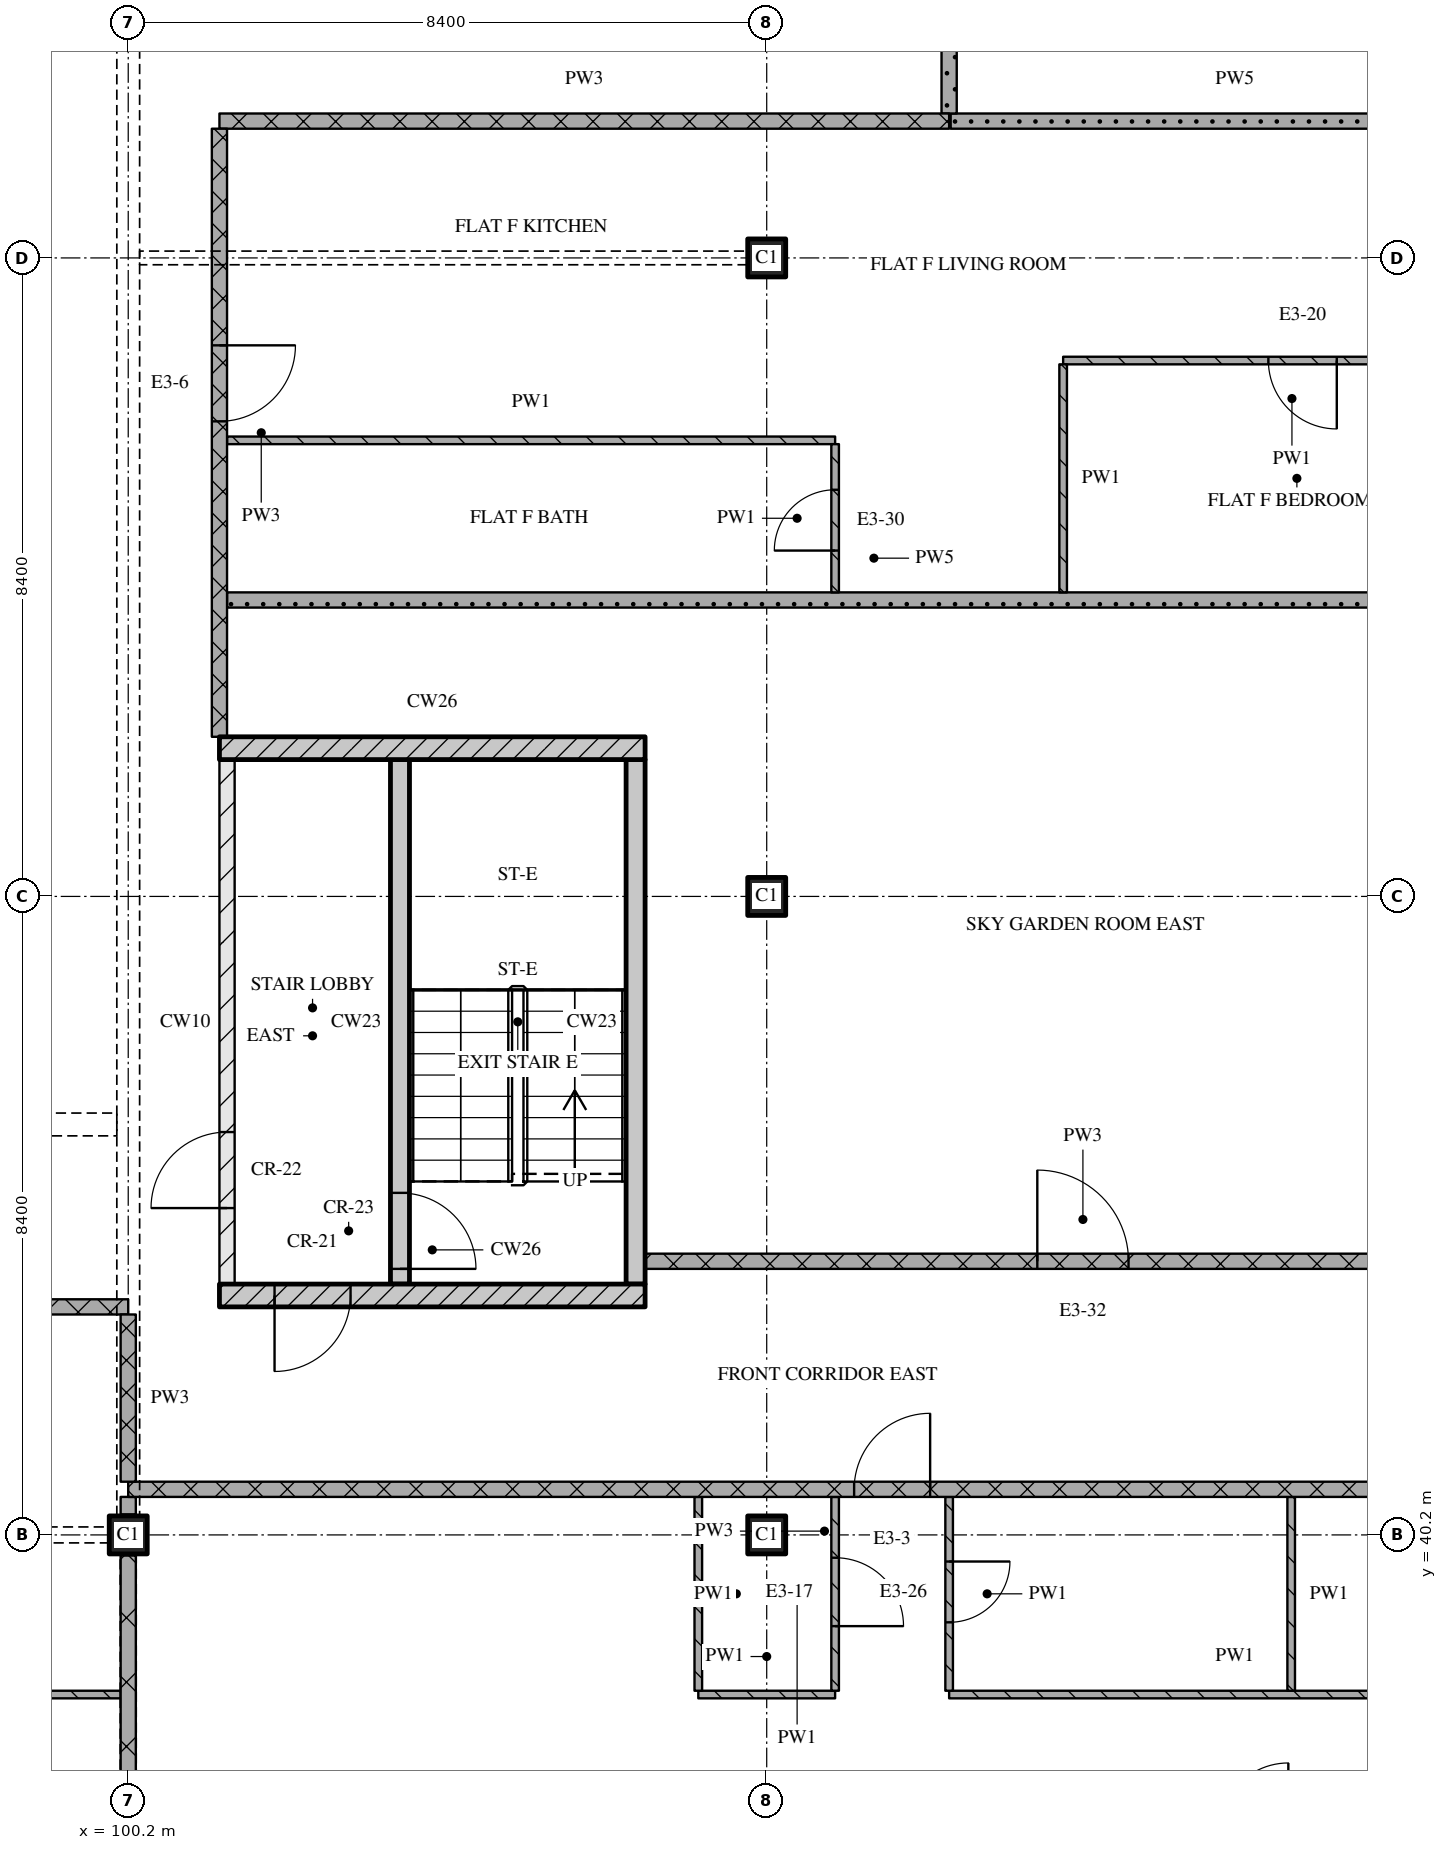
"""IFC4 building model, lengths in metres.
Left out: names, types, materials, properties, quantities, classifications, styles, units other than length and angle.
Written with IfcOpenShell. Run it as: python <this file> out.ifc"""

import sys

from ifc_helpers import new_model, si_unit, direction, frame, frame_2d, origin, origin_2d, place, context, subcontext, project, spatial, rectangle, extrude, element, fill, save


model = new_model("IFC4")
c1 = context("Model", 3, precision=1e-05, world=origin(), true_north=direction((0.0, 1.0)))
c2 = subcontext(c1, "Body", "Model", "MODEL_VIEW")
j1 = project(units=[si_unit("LENGTHUNIT", "METRE"), si_unit("PLANEANGLEUNIT", "RADIAN")], contexts=[c1])
p1 = place(None, origin())
s1 = spatial("IfcSite", under=j1, at=p1, CompositionType="ELEMENT")
p2 = place(p1, origin())
s2 = spatial("IfcBuilding", under=s1, at=p2, CompositionType="ELEMENT")
p3 = place(p2, frame((0.0, 0.0, 277.95)))
s3 = spatial("IfcBuildingStorey", under=s2, at=p3, CompositionType="ELEMENT", Elevation=277.95)
for number, where, z_axis, x_axis in (
    (1, (100.2, 40.2, 0.0), (0.0, 0.0, 1.0), (1.0, 0.0, 0.0)),
    (2, (108.6, 40.2, 0.0), (0.0, 0.0, 1.0), (1.0, 0.0, 0.0)),
    (3, (108.6, 48.6, 0.0), (0.0, 0.0, 1.0), (1.0, 0.0, 0.0)),
    (4, (108.6, 57.0, 0.0), (0.0, 0.0, 1.0), (1.0, 0.0, 0.0)),
):
    element("IfcColumn", number, at=place(p3, frame(where, z_axis=z_axis, x_axis=x_axis)), inside=s3, PredefinedType="COLUMN", context=c2, shape_type="SweptSolid", body=[
        extrude(rectangle(XDim=0.5, YDim=0.5, at=origin_2d()), origin(), (0.0, 0.0, 1.0), 3.6),
    ])
p4 = place(p3, frame((101.4, 43.35, 0.0), z_axis=(0.0, 0.0, 1.0), x_axis=(1.0, 0.0, 0.0)))
e5 = element("IfcWall", 5, at=p4, inside=s3, PredefinedType="SOLIDWALL", context=c2, shape_type="SweptSolid", body=[
    extrude(rectangle(XDim=5.6, YDim=0.3, at=frame_2d((2.8, 0.0))), origin(), (0.0, 0.0, 1.0), 3.32),
])
p5 = place(p4, frame((0.725, 0.0, 0.0)))
e6 = element("IfcOpeningElement", 6, at=p5, cuts=e5, PredefinedType="OPENING", context=c2, shape_type="SweptSolid", body=[
    extrude(rectangle(XDim=1.0, YDim=2.1, at=frame_2d((0.5, 1.05))), frame((0.0, 0.16, 0.0), z_axis=(0.0, -1.0, 0.0), x_axis=(1.0, 0.0, 0.0)), (0.0, 0.0, 1.0), 0.32),
])
p6 = place(p3, frame((101.5, 43.5, 0.0), z_axis=(0.0, 0.0, 1.0), x_axis=(0.0, 1.0, 0.0)))
e7 = element("IfcWall", 7, at=p6, inside=s3, PredefinedType="PARTITIONING", context=c2, shape_type="SweptSolid", body=[
    extrude(rectangle(XDim=6.9, YDim=0.2, at=frame_2d((3.45, 0.0))), origin(), (0.0, 0.0, 1.0), 3.32),
])
p7 = place(p6, frame((1.0, 0.0, 0.0)))
e8 = element("IfcOpeningElement", 8, at=p7, cuts=e7, PredefinedType="OPENING", context=c2, shape_type="SweptSolid", body=[
    extrude(rectangle(XDim=1.0, YDim=2.1, at=frame_2d((0.5, 1.05))), frame((0.0, 0.11, 0.0), z_axis=(0.0, -1.0, 0.0), x_axis=(1.0, 0.0, 0.0)), (0.0, 0.0, 1.0), 0.22),
])
p8 = place(p3, frame((103.775, 43.5, 0.0), z_axis=(0.0, 0.0, 1.0), x_axis=(0.0, 1.0, 0.0)))
e9 = element("IfcWall", 9, at=p8, inside=s3, PredefinedType="SOLIDWALL", context=c2, shape_type="SweptSolid", body=[
    extrude(rectangle(XDim=6.9, YDim=0.25, at=frame_2d((3.45, 0.0))), origin(), (0.0, 0.0, 1.0), 3.32),
])
p9 = place(p8, frame((0.2, 0.0, 0.0)))
e10 = element("IfcOpeningElement", 10, at=p9, cuts=e9, PredefinedType="OPENING", context=c2, shape_type="SweptSolid", body=[
    extrude(rectangle(XDim=1.0, YDim=2.1, at=frame_2d((0.5, 1.05))), frame((0.0, 0.135, 0.0), z_axis=(0.0, -1.0, 0.0), x_axis=(1.0, 0.0, 0.0)), (0.0, 0.0, 1.0), 0.27),
])
p10 = place(p3, frame((106.875, 43.5, 0.0), z_axis=(0.0, 0.0, 1.0), x_axis=(0.0, 1.0, 0.0)))
e11 = element("IfcWall", 11, at=p10, inside=s3, PredefinedType="SOLIDWALL", context=c2, shape_type="SweptSolid", body=[
    extrude(rectangle(XDim=6.9, YDim=0.25, at=frame_2d((3.45, 0.0))), origin(), (0.0, 0.0, 1.0), 3.32),
])
p11 = place(p3, frame((101.4, 50.55, 0.0), z_axis=(0.0, 0.0, 1.0), x_axis=(1.0, 0.0, 0.0)))
e12 = element("IfcWall", 12, at=p11, inside=s3, PredefinedType="SOLIDWALL", context=c2, shape_type="SweptSolid", body=[
    extrude(rectangle(XDim=5.6, YDim=0.3, at=frame_2d((2.8, 0.0))), origin(), (0.0, 0.0, 1.0), 3.32),
])
p12 = place(p3, frame((90.6, 38.1, 0.0), z_axis=(0.0, 0.0, 1.0), x_axis=(1.0, 0.0, 0.0)))
e13 = element("IfcWall", 13, at=p12, inside=s3, PredefinedType="PARTITIONING", context=c2, shape_type="SweptSolid", body=[
    extrude(rectangle(XDim=9.5, YDim=0.1, at=frame_2d((4.75, 0.0))), origin(), (0.0, 0.0, 1.0), 3.32),
])
p13 = place(p12, frame((4.35, 0.0, 0.0)))
e14 = element("IfcOpeningElement", 14, at=p13, cuts=e13, PredefinedType="OPENING", context=c2, shape_type="SweptSolid", body=[
    extrude(rectangle(XDim=0.9, YDim=2.1, at=frame_2d((0.45, 1.05))), frame((0.0, 0.06, 0.0), z_axis=(0.0, -1.0, 0.0), x_axis=(1.0, 0.0, 0.0)), (0.0, 0.0, 1.0), 0.12),
])
p14 = place(p3, frame((107.7, 38.1, 0.0), z_axis=(0.0, 0.0, 1.0), x_axis=(1.0, 0.0, 0.0)))
e15 = element("IfcWall", 15, at=p14, inside=s3, PredefinedType="PARTITIONING", context=c2, shape_type="SweptSolid", body=[
    extrude(rectangle(XDim=1.8, YDim=0.1, at=frame_2d((0.9, 0.0))), origin(), (0.0, 0.0, 1.0), 3.32),
])
p15 = place(p3, frame((111.0, 38.1, 0.0), z_axis=(0.0, 0.0, 1.0), x_axis=(1.0, 0.0, 0.0)))
e16 = element("IfcWall", 16, at=p15, inside=s3, PredefinedType="PARTITIONING", context=c2, shape_type="SweptSolid", body=[
    extrude(rectangle(XDim=7.52, YDim=0.1, at=frame_2d((3.76, 0.0))), origin(), (0.0, 0.0, 1.0), 3.32),
])
p16 = place(p15, frame((5.75, 0.0, 0.0)))
e17 = element("IfcOpeningElement", 17, at=p16, cuts=e16, PredefinedType="OPENING", context=c2, shape_type="SweptSolid", body=[
    extrude(rectangle(XDim=0.8, YDim=2.1, at=frame_2d((0.4, 1.05))), frame((0.0, 0.06, 0.0), z_axis=(0.0, -1.0, 0.0), x_axis=(1.0, 0.0, 0.0)), (0.0, 0.0, 1.0), 0.12),
])
p17 = place(p3, frame((118.52, 40.8, 0.0), z_axis=(0.0, 0.0, 1.0), x_axis=(-1.0, 0.0, 0.0)))
e18 = element("IfcWall", 18, at=p17, inside=s3, PredefinedType="PARTITIONING", context=c2, shape_type="SweptSolid", body=[
    extrude(rectangle(XDim=18.32, YDim=0.2, at=frame_2d((9.16, 0.0))), origin(), (0.0, 0.0, 1.0), 3.32),
])
p18 = place(p17, frame((7.77, 0.0, 0.0)))
e19 = element("IfcOpeningElement", 19, at=p18, cuts=e18, PredefinedType="OPENING", context=c2, shape_type="SweptSolid", body=[
    extrude(rectangle(XDim=1.0, YDim=2.1, at=frame_2d((0.5, 1.05))), frame((0.0, 0.11, 0.0), z_axis=(0.0, -1.0, 0.0), x_axis=(1.0, 0.0, 0.0)), (0.0, 0.0, 1.0), 0.22),
])
p19 = place(p3, frame((100.2, 43.2, 0.0), z_axis=(0.0, 0.0, 1.0), x_axis=(-1.0, 0.0, 0.0)))
e20 = element("IfcWall", 20, at=p19, inside=s3, PredefinedType="PARTITIONING", context=c2, shape_type="SweptSolid", body=[
    extrude(rectangle(XDim=25.2, YDim=0.2, at=frame_2d((12.6, 0.0))), origin(), (0.0, 0.0, 1.0), 3.32),
])
p20 = place(p19, frame((17.35, 0.0, 0.0)))
e21 = element("IfcOpeningElement", 21, at=p20, cuts=e20, PredefinedType="OPENING", context=c2, shape_type="SweptSolid", body=[
    extrude(rectangle(XDim=1.0, YDim=2.1, at=frame_2d((0.5, 1.05))), frame((0.0, 0.11, 0.0), z_axis=(0.0, -1.0, 0.0), x_axis=(1.0, 0.0, 0.0)), (0.0, 0.0, 1.0), 0.22),
])
p21 = place(p3, frame((107.0, 43.8, 0.0), z_axis=(0.0, 0.0, 1.0), x_axis=(1.0, 0.0, 0.0)))
e22 = element("IfcWall", 22, at=p21, inside=s3, PredefinedType="PARTITIONING", context=c2, shape_type="SweptSolid", body=[
    extrude(rectangle(XDim=11.52, YDim=0.2, at=frame_2d((5.76, 0.0))), origin(), (0.0, 0.0, 1.0), 3.32),
])
p22 = place(p21, frame((5.16, 0.0, 0.0)))
e23 = element("IfcOpeningElement", 23, at=p22, cuts=e22, PredefinedType="OPENING", context=c2, shape_type="SweptSolid", body=[
    extrude(rectangle(XDim=1.2, YDim=2.1, at=frame_2d((0.6, 1.05))), frame((0.0, 0.11, 0.0), z_axis=(0.0, -1.0, 0.0), x_axis=(1.0, 0.0, 0.0)), (0.0, 0.0, 1.0), 0.22),
])
p23 = place(p3, frame((101.5, 52.5, 0.0), z_axis=(0.0, 0.0, 1.0), x_axis=(1.0, 0.0, 0.0)))
e24 = element("IfcWall", 24, at=p23, inside=s3, PredefinedType="PARTITIONING", context=c2, shape_type="SweptSolid", body=[
    extrude(rectangle(XDim=17.02, YDim=0.2, at=frame_2d((8.51, 0.0))), origin(), (0.0, 0.0, 1.0), 3.32),
])
p24 = place(p3, frame((101.5, 54.6, 0.0), z_axis=(0.0, 0.0, 1.0), x_axis=(1.0, 0.0, 0.0)))
e25 = element("IfcWall", 25, at=p24, inside=s3, PredefinedType="PARTITIONING", context=c2, shape_type="SweptSolid", body=[
    extrude(rectangle(XDim=8.0, YDim=0.1, at=frame_2d((4.0, 0.0))), origin(), (0.0, 0.0, 1.0), 3.32),
])
p25 = place(p3, frame((118.52, 55.65, 0.0), z_axis=(0.0, 0.0, 1.0), x_axis=(-1.0, 0.0, 0.0)))
e26 = element("IfcWall", 26, at=p25, inside=s3, PredefinedType="PARTITIONING", context=c2, shape_type="SweptSolid", body=[
    extrude(rectangle(XDim=6.02, YDim=0.1, at=frame_2d((3.01, 0.0))), origin(), (0.0, 0.0, 1.0), 3.32),
])
p26 = place(p25, frame((2.42, 0.0, 0.0)))
e27 = element("IfcOpeningElement", 27, at=p26, cuts=e26, PredefinedType="OPENING", context=c2, shape_type="SweptSolid", body=[
    extrude(rectangle(XDim=0.9, YDim=2.1, at=frame_2d((0.45, 1.05))), frame((0.0, 0.06, 0.0), z_axis=(0.0, -1.0, 0.0), x_axis=(1.0, 0.0, 0.0)), (0.0, 0.0, 1.0), 0.12),
])
p27 = place(p3, frame((101.4, 58.8, 0.0), z_axis=(0.0, 0.0, 1.0), x_axis=(1.0, 0.0, 0.0)))
e28 = element("IfcWall", 28, at=p27, inside=s3, PredefinedType="PARTITIONING", context=c2, shape_type="SweptSolid", body=[
    extrude(rectangle(XDim=9.6, YDim=0.2, at=frame_2d((4.8, 0.0))), origin(), (0.0, 0.0, 1.0), 3.32),
])
p28 = place(p3, frame((111.02, 58.8, 0.0), z_axis=(0.0, 0.0, 1.0), x_axis=(1.0, 0.0, 0.0)))
e29 = element("IfcWall", 29, at=p28, inside=s3, PredefinedType="PARTITIONING", context=c2, shape_type="SweptSolid", body=[
    extrude(rectangle(XDim=7.48, YDim=0.2, at=frame_2d((3.74, 0.0))), origin(), (0.0, 0.0, 1.0), 3.32),
])
p29 = place(p3, frame((100.2, 43.1, 0.0), z_axis=(0.0, 0.0, 1.0), x_axis=(0.0, -1.0, 0.0)))
e30 = element("IfcWall", 30, at=p29, inside=s3, PredefinedType="PARTITIONING", context=c2, shape_type="SweptSolid", body=[
    extrude(rectangle(XDim=2.2, YDim=0.2, at=frame_2d((1.1, 0.0))), origin(), (0.0, 0.0, 1.0), 2.53),
])
p30 = place(p3, frame((100.2, 39.93, 0.0), z_axis=(0.0, 0.0, 1.0), x_axis=(0.0, -1.0, 0.0)))
e31 = element("IfcWall", 31, at=p30, inside=s3, PredefinedType="PARTITIONING", context=c2, shape_type="SweptSolid", body=[
    extrude(rectangle(XDim=7.86, YDim=0.2, at=frame_2d((3.93, 0.0))), origin(), (0.0, 0.0, 1.0), 2.77),
])
p31 = place(p3, frame((100.2, 40.7, 0.0), z_axis=(0.0, 0.0, 1.0), x_axis=(0.0, -1.0, 0.0)))
e32 = element("IfcWall", 32, at=p31, inside=s3, PredefinedType="PARTITIONING", context=c2, shape_type="SweptSolid", body=[
    extrude(rectangle(XDim=0.23, YDim=0.2, at=frame_2d((0.115, 0.0))), origin(), (0.0, 0.0, 1.0), 3.32),
])
p32 = place(p3, frame((101.4, 58.7, 0.0), z_axis=(0.0, 0.0, 1.0), x_axis=(0.0, -1.0, 0.0)))
e33 = element("IfcWall", 33, at=p32, inside=s3, PredefinedType="PARTITIONING", context=c2, shape_type="SweptSolid", body=[
    extrude(rectangle(XDim=8.0, YDim=0.2, at=frame_2d((4.0, 0.0))), origin(), (0.0, 0.0, 1.0), 3.32),
])
p33 = place(p32, frame((2.85, 0.0, 0.0)))
e34 = element("IfcOpeningElement", 34, at=p33, cuts=e33, PredefinedType="OPENING", context=c2, shape_type="SweptSolid", body=[
    extrude(rectangle(XDim=1.0, YDim=2.1, at=frame_2d((0.5, 1.05))), frame((0.0, 0.11, 0.0), z_axis=(0.0, -1.0, 0.0), x_axis=(1.0, 0.0, 0.0)), (0.0, 0.0, 1.0), 0.22),
])
p34 = place(p3, frame((107.7, 40.7, 0.0), z_axis=(0.0, 0.0, 1.0), x_axis=(0.0, -1.0, 0.0)))
e35 = element("IfcWall", 35, at=p34, inside=s3, PredefinedType="PARTITIONING", context=c2, shape_type="SweptSolid", body=[
    extrude(rectangle(XDim=2.55, YDim=0.1, at=frame_2d((1.275, 0.0))), origin(), (0.0, 0.0, 1.0), 3.32),
])
p35 = place(p3, frame((109.5, 38.15, 0.0), z_axis=(0.0, 0.0, 1.0), x_axis=(0.0, 1.0, 0.0)))
e36 = element("IfcWall", 36, at=p35, inside=s3, PredefinedType="PARTITIONING", context=c2, shape_type="SweptSolid", body=[
    extrude(rectangle(XDim=2.55, YDim=0.1, at=frame_2d((1.275, 0.0))), origin(), (0.0, 0.0, 1.0), 3.32),
])
p36 = place(p35, frame((0.85, 0.0, 0.0)))
e37 = element("IfcOpeningElement", 37, at=p36, cuts=e36, PredefinedType="OPENING", context=c2, shape_type="SweptSolid", body=[
    extrude(rectangle(XDim=0.9, YDim=2.1, at=frame_2d((0.45, 1.05))), frame((0.0, 0.06, 0.0), z_axis=(0.0, -1.0, 0.0), x_axis=(1.0, 0.0, 0.0)), (0.0, 0.0, 1.0), 0.12),
])
p37 = place(p3, frame((109.5, 52.6, 0.0), z_axis=(0.0, 0.0, 1.0), x_axis=(0.0, 1.0, 0.0)))
e38 = element("IfcWall", 38, at=p37, inside=s3, PredefinedType="PARTITIONING", context=c2, shape_type="SweptSolid", body=[
    extrude(rectangle(XDim=1.95, YDim=0.1, at=frame_2d((0.975, 0.0))), origin(), (0.0, 0.0, 1.0), 3.32),
])
p38 = place(p37, frame((0.55, 0.0, 0.0)))
e39 = element("IfcOpeningElement", 39, at=p38, cuts=e38, PredefinedType="OPENING", context=c2, shape_type="SweptSolid", body=[
    extrude(rectangle(XDim=0.8, YDim=2.1, at=frame_2d((0.4, 1.05))), frame((0.0, 0.06, 0.0), z_axis=(0.0, -1.0, 0.0), x_axis=(1.0, 0.0, 0.0)), (0.0, 0.0, 1.0), 0.12),
])
p39 = place(p3, frame((111.0, 61.1, 0.0), z_axis=(0.0, 0.0, 1.0), x_axis=(0.0, -1.0, 0.0)))
e40 = element("IfcWall", 40, at=p39, inside=s3, PredefinedType="PARTITIONING", context=c2, shape_type="SweptSolid", body=[
    extrude(rectangle(XDim=2.2, YDim=0.2, at=frame_2d((1.1, 0.0))), origin(), (0.0, 0.0, 1.0), 3.32),
])
p40 = place(p3, frame((111.0, 40.7, 0.0), z_axis=(0.0, 0.0, 1.0), x_axis=(0.0, -1.0, 0.0)))
e41 = element("IfcWall", 41, at=p40, inside=s3, PredefinedType="PARTITIONING", context=c2, shape_type="SweptSolid", body=[
    extrude(rectangle(XDim=2.55, YDim=0.1, at=frame_2d((1.275, 0.0))), origin(), (0.0, 0.0, 1.0), 3.32),
])
p41 = place(p40, frame((0.85, 0.0, 0.0)))
e42 = element("IfcOpeningElement", 42, at=p41, cuts=e41, PredefinedType="OPENING", context=c2, shape_type="SweptSolid", body=[
    extrude(rectangle(XDim=0.8, YDim=2.1, at=frame_2d((0.4, 1.05))), frame((0.0, 0.06, 0.0), z_axis=(0.0, -1.0, 0.0), x_axis=(1.0, 0.0, 0.0)), (0.0, 0.0, 1.0), 0.12),
])
p42 = place(p3, frame((112.5, 55.6, 0.0), z_axis=(0.0, 0.0, 1.0), x_axis=(0.0, -1.0, 0.0)))
e43 = element("IfcWall", 43, at=p42, inside=s3, PredefinedType="PARTITIONING", context=c2, shape_type="SweptSolid", body=[
    extrude(rectangle(XDim=3.0, YDim=0.1, at=frame_2d((1.5, 0.0))), origin(), (0.0, 0.0, 1.0), 3.32),
])
p43 = place(p3, frame((115.5, 40.7, 0.0), z_axis=(0.0, 0.0, 1.0), x_axis=(0.0, -1.0, 0.0)))
e44 = element("IfcWall", 44, at=p43, inside=s3, PredefinedType="PARTITIONING", context=c2, shape_type="SweptSolid", body=[
    extrude(rectangle(XDim=2.55, YDim=0.1, at=frame_2d((1.275, 0.0))), origin(), (0.0, 0.0, 1.0), 3.32),
])
p44 = place(p5, origin())
e45 = element("IfcDoor", 45, at=p44, inside=s3, OperationType="SINGLE_SWING_RIGHT", PredefinedType="DOOR", context=c2, shape_type="SweptSolid", body=[
    extrude(rectangle(XDim=1.0, YDim=2.1, at=frame_2d((0.5, 1.05))), frame((0.0, 0.025, 0.0), z_axis=(0.0, -1.0, 0.0), x_axis=(1.0, 0.0, 0.0)), (0.0, 0.0, 1.0), 0.05),
])
fill(e6, e45)
p45 = place(p9, origin())
e46 = element("IfcDoor", 46, at=p45, inside=s3, OperationType="SINGLE_SWING_RIGHT", PredefinedType="DOOR", context=c2, shape_type="SweptSolid", body=[
    extrude(rectangle(XDim=1.0, YDim=2.1, at=frame_2d((0.5, 1.05))), frame((0.0, 0.025, 0.0), z_axis=(0.0, -1.0, 0.0), x_axis=(1.0, 0.0, 0.0)), (0.0, 0.0, 1.0), 0.05),
])
fill(e10, e46)
p46 = place(p7, origin())
e47 = element("IfcDoor", 47, at=p46, inside=s3, OperationType="SINGLE_SWING_LEFT", PredefinedType="DOOR", context=c2, shape_type="SweptSolid", body=[
    extrude(rectangle(XDim=1.0, YDim=2.1, at=frame_2d((0.5, 1.05))), frame((0.0, 0.025, 0.0), z_axis=(0.0, -1.0, 0.0), x_axis=(1.0, 0.0, 0.0)), (0.0, 0.0, 1.0), 0.05),
])
fill(e8, e47)
p47 = place(p18, origin())
e48 = element("IfcDoor", 48, at=p47, inside=s3, OperationType="SINGLE_SWING_RIGHT", PredefinedType="DOOR", context=c2, shape_type="SweptSolid", body=[
    extrude(rectangle(XDim=1.0, YDim=2.1, at=frame_2d((0.5, 1.05))), frame((0.0, 0.025, 0.0), z_axis=(0.0, -1.0, 0.0), x_axis=(1.0, 0.0, 0.0)), (0.0, 0.0, 1.0), 0.05),
])
fill(e19, e48)
p48 = place(p22, origin())
e49 = element("IfcDoor", 49, at=p48, inside=s3, OperationType="SINGLE_SWING_LEFT", PredefinedType="DOOR", context=c2, shape_type="SweptSolid", body=[
    extrude(rectangle(XDim=1.2, YDim=2.1, at=frame_2d((0.6, 1.05))), frame((0.0, 0.025, 0.0), z_axis=(0.0, -1.0, 0.0), x_axis=(1.0, 0.0, 0.0)), (0.0, 0.0, 1.0), 0.05),
])
fill(e23, e49)
p49 = place(p26, origin())
e50 = element("IfcDoor", 50, at=p49, inside=s3, OperationType="SINGLE_SWING_LEFT", PredefinedType="DOOR", context=c2, shape_type="SweptSolid", body=[
    extrude(rectangle(XDim=0.9, YDim=2.1, at=frame_2d((0.45, 1.05))), frame((0.0, 0.025, 0.0), z_axis=(0.0, -1.0, 0.0), x_axis=(1.0, 0.0, 0.0)), (0.0, 0.0, 1.0), 0.05),
])
fill(e27, e50)
p50 = place(p33, origin())
e51 = element("IfcDoor", 51, at=p50, inside=s3, OperationType="SINGLE_SWING_LEFT", PredefinedType="DOOR", context=c2, shape_type="SweptSolid", body=[
    extrude(rectangle(XDim=1.0, YDim=2.1, at=frame_2d((0.5, 1.05))), frame((0.0, 0.025, 0.0), z_axis=(0.0, -1.0, 0.0), x_axis=(1.0, 0.0, 0.0)), (0.0, 0.0, 1.0), 0.05),
])
fill(e34, e51)
p51 = place(p36, origin())
e52 = element("IfcDoor", 52, at=p51, inside=s3, OperationType="SINGLE_SWING_RIGHT", PredefinedType="DOOR", context=c2, shape_type="SweptSolid", body=[
    extrude(rectangle(XDim=0.9, YDim=2.1, at=frame_2d((0.45, 1.05))), frame((0.0, 0.025, 0.0), z_axis=(0.0, -1.0, 0.0), x_axis=(1.0, 0.0, 0.0)), (0.0, 0.0, 1.0), 0.05),
])
fill(e37, e52)
p52 = place(p38, origin())
e53 = element("IfcDoor", 53, at=p52, inside=s3, OperationType="SINGLE_SWING_LEFT", PredefinedType="DOOR", context=c2, shape_type="SweptSolid", body=[
    extrude(rectangle(XDim=0.8, YDim=2.1, at=frame_2d((0.4, 1.05))), frame((0.0, 0.025, 0.0), z_axis=(0.0, -1.0, 0.0), x_axis=(1.0, 0.0, 0.0)), (0.0, 0.0, 1.0), 0.05),
])
fill(e39, e53)
p53 = place(p41, origin())
e54 = element("IfcDoor", 54, at=p53, inside=s3, OperationType="SINGLE_SWING_LEFT", PredefinedType="DOOR", context=c2, shape_type="SweptSolid", body=[
    extrude(rectangle(XDim=0.8, YDim=2.1, at=frame_2d((0.4, 1.05))), frame((0.0, 0.025, 0.0), z_axis=(0.0, -1.0, 0.0), x_axis=(1.0, 0.0, 0.0)), (0.0, 0.0, 1.0), 0.05),
])
fill(e42, e54)
save(model, sys.argv[1])
